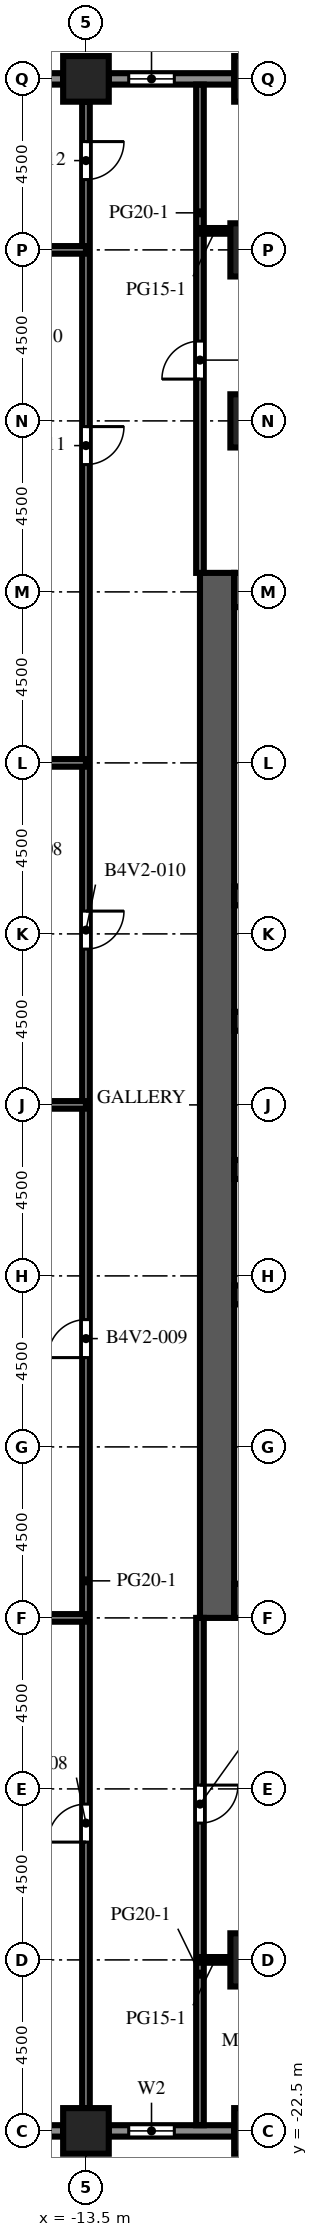
"""IFC4 building model, lengths in metres.
Left out: names, types, materials, properties, quantities, classifications, styles, units other than length and angle.
Written with IfcOpenShell. Run it as: python <this file> out.ifc"""

import sys

from ifc_helpers import new_model, si_unit, direction, frame, frame_2d, origin, origin_2d, place, context, subcontext, project, spatial, rectangle, extrude, element, fill, save


model = new_model("IFC4")
c1 = context("Model", 3, precision=1e-05, world=origin(), true_north=direction((0.0, 1.0)))
c2 = subcontext(c1, "Body", "Model", "MODEL_VIEW")
j1 = project(units=[si_unit("LENGTHUNIT", "METRE"), si_unit("PLANEANGLEUNIT", "RADIAN")], contexts=[c1])
p1 = place(None, origin())
s1 = spatial("IfcSite", under=j1, at=p1, CompositionType="ELEMENT")
p2 = place(p1, origin())
s2 = spatial("IfcBuilding", under=s1, at=p2, CompositionType="ELEMENT")
p3 = place(p2, frame((0.0, 0.0, 137.2)))
s3 = spatial("IfcBuildingStorey", under=s2, at=p3, CompositionType="ELEMENT", Elevation=137.2)
for number, where, z_axis, x_axis in (
    (1, (-13.5, -22.5, 0.0), (0.0, 0.0, 1.0), (1.0, 0.0, 0.0)),
    (2, (-13.5, 31.5, 0.0), (0.0, 0.0, 1.0), (1.0, 0.0, 0.0)),
    (3, (-9.0, -22.5, 0.0), (0.0, 0.0, 1.0), (1.0, 0.0, 0.0)),
    (4, (-9.0, 31.5, 0.0), (0.0, 0.0, 1.0), (1.0, 0.0, 0.0)),
):
    element("IfcColumn", number, at=place(p3, frame(where, z_axis=z_axis, x_axis=x_axis)), inside=s3, PredefinedType="COLUMN", context=c2, shape_type="SweptSolid", body=[
        extrude(rectangle(XDim=1.2, YDim=1.2, at=origin_2d()), origin(), (0.0, 0.0, 1.0), 4.1),
    ])
for number, where, z_axis, x_axis in (
    (5, (-9.0, -18.0, 0.0), (0.0, 0.0, 1.0), (1.0, 0.0, 0.0)),
    (6, (-9.0, 22.5, 0.0), (0.0, 0.0, 1.0), (1.0, 0.0, 0.0)),
    (7, (-9.0, 27.0, 0.0), (0.0, 0.0, 1.0), (1.0, 0.0, 0.0)),
):
    element("IfcColumn", number, at=place(p3, frame(where, z_axis=z_axis, x_axis=x_axis)), inside=s3, PredefinedType="COLUMN", context=c2, shape_type="SweptSolid", body=[
        extrude(rectangle(XDim=1.4, YDim=1.4, at=origin_2d()), origin(), (0.0, 0.0, 1.0), 4.1),
    ])
p4 = place(p3, frame((-10.05, -9.0, 0.0), z_axis=(0.0, 0.0, 1.0), x_axis=(0.0, 1.0, 0.0)))
e8 = element("IfcWall", 8, at=p4, inside=s3, PredefinedType="SHEAR", context=c2, shape_type="SweptSolid", body=[
    extrude(rectangle(XDim=27.5, YDim=0.9, at=frame_2d((13.75, 0.0))), origin(), (0.0, 0.0, 1.0), 4.1),
])
p5 = place(p4, frame((12.55, 0.0, 0.0)))
e9 = element("IfcOpeningElement", 9, at=p5, cuts=e8, PredefinedType="OPENING", context=c2, shape_type="SweptSolid", body=[
    extrude(rectangle(XDim=2.4, YDim=2.4, at=frame_2d((1.2, 1.2))), frame((0.0, 0.46, 0.0), z_axis=(0.0, -1.0, 0.0), x_axis=(1.0, 0.0, 0.0)), (0.0, 0.0, 1.0), 0.92),
])
p6 = place(p4, frame((6.825, 0.0, 0.0)))
e10 = element("IfcOpeningElement", 10, at=p6, cuts=e8, PredefinedType="OPENING", context=c2, shape_type="SweptSolid", body=[
    extrude(rectangle(XDim=1.2, YDim=2.1, at=frame_2d((0.6, 1.05))), frame((0.0, 0.46, 0.0), z_axis=(0.0, -1.0, 0.0), x_axis=(1.0, 0.0, 0.0)), (0.0, 0.0, 1.0), 0.92),
])
p7 = place(p4, frame((19.475, 0.0, 0.0)))
e11 = element("IfcOpeningElement", 11, at=p7, cuts=e8, PredefinedType="OPENING", context=c2, shape_type="SweptSolid", body=[
    extrude(rectangle(XDim=1.2, YDim=2.1, at=frame_2d((0.6, 1.05))), frame((0.0, 0.46, 0.0), z_axis=(0.0, -1.0, 0.0), x_axis=(1.0, 0.0, 0.0)), (0.0, 0.0, 1.0), 0.92),
])
for number, where, z_axis, x_axis in (
    (12, (-9.6, -8.55, 0.0), (0.0, 0.0, 1.0), (1.0, 0.0, 0.0)),
    (13, (-9.6, 18.05, 0.0), (0.0, 0.0, 1.0), (1.0, 0.0, 0.0)),
):
    element("IfcWall", number, at=place(p3, frame(where, z_axis=z_axis, x_axis=x_axis)), inside=s3, PredefinedType="SHEAR", context=c2, shape_type="SweptSolid", body=[
        extrude(rectangle(XDim=10.2, YDim=0.9, at=frame_2d((5.1, 0.0))), origin(), (0.0, 0.0, 1.0), 4.1),
    ])
p8 = place(p3, frame((-9.6, -0.5, 0.0), z_axis=(0.0, 0.0, 1.0), x_axis=(1.0, 0.0, 0.0)))
e14 = element("IfcWall", 14, at=p8, inside=s3, PredefinedType="SHEAR", context=c2, shape_type="SweptSolid", body=[
    extrude(rectangle(XDim=10.2, YDim=0.5, at=frame_2d((5.1, 0.0))), origin(), (0.0, 0.0, 1.0), 4.1),
])
p9 = place(p3, frame((-9.6, 2.8, 0.0), z_axis=(0.0, 0.0, 1.0), x_axis=(1.0, 0.0, 0.0)))
e15 = element("IfcWall", 15, at=p9, inside=s3, PredefinedType="SHEAR", context=c2, shape_type="SweptSolid", body=[
    extrude(rectangle(XDim=10.2, YDim=0.5, at=frame_2d((5.1, 0.0))), origin(), (0.0, 0.0, 1.0), 4.1),
])
p10 = place(p9, frame((0.562, 0.0, 0.0)))
e16 = element("IfcOpeningElement", 16, at=p10, cuts=e15, PredefinedType="OPENING", context=c2, shape_type="SweptSolid", body=[
    extrude(rectangle(XDim=1.1, YDim=2.1, at=frame_2d((0.55, 1.05))), frame((0.0, 0.26, 0.0), z_axis=(0.0, -1.0, 0.0), x_axis=(1.0, 0.0, 0.0)), (0.0, 0.0, 1.0), 0.52),
])
p11 = place(p9, frame((3.238, 0.0, 0.0)))
e17 = element("IfcOpeningElement", 17, at=p11, cuts=e15, PredefinedType="OPENING", context=c2, shape_type="SweptSolid", body=[
    extrude(rectangle(XDim=1.1, YDim=2.1, at=frame_2d((0.55, 1.05))), frame((0.0, 0.26, 0.0), z_axis=(0.0, -1.0, 0.0), x_axis=(1.0, 0.0, 0.0)), (0.0, 0.0, 1.0), 0.52),
])
p12 = place(p9, frame((8.538, 0.0, 0.0)))
e18 = element("IfcOpeningElement", 18, at=p12, cuts=e15, PredefinedType="OPENING", context=c2, shape_type="SweptSolid", body=[
    extrude(rectangle(XDim=1.1, YDim=2.1, at=frame_2d((0.55, 1.05))), frame((0.0, 0.26, 0.0), z_axis=(0.0, -1.0, 0.0), x_axis=(1.0, 0.0, 0.0)), (0.0, 0.0, 1.0), 0.52),
])
p13 = place(p3, frame((-9.6, 6.7, 0.0), z_axis=(0.0, 0.0, 1.0), x_axis=(1.0, 0.0, 0.0)))
e19 = element("IfcWall", 19, at=p13, inside=s3, PredefinedType="SHEAR", context=c2, shape_type="SweptSolid", body=[
    extrude(rectangle(XDim=10.2, YDim=0.5, at=frame_2d((5.1, 0.0))), origin(), (0.0, 0.0, 1.0), 4.1),
])
p14 = place(p13, frame((0.562, 0.0, 0.0)))
e20 = element("IfcOpeningElement", 20, at=p14, cuts=e19, PredefinedType="OPENING", context=c2, shape_type="SweptSolid", body=[
    extrude(rectangle(XDim=1.1, YDim=2.1, at=frame_2d((0.55, 1.05))), frame((0.0, 0.26, 0.0), z_axis=(0.0, -1.0, 0.0), x_axis=(1.0, 0.0, 0.0)), (0.0, 0.0, 1.0), 0.52),
])
p15 = place(p13, frame((3.288, 0.0, 0.0)))
e21 = element("IfcOpeningElement", 21, at=p15, cuts=e19, PredefinedType="OPENING", context=c2, shape_type="SweptSolid", body=[
    extrude(rectangle(XDim=1.0, YDim=2.1, at=frame_2d((0.5, 1.05))), frame((0.0, 0.26, 0.0), z_axis=(0.0, -1.0, 0.0), x_axis=(1.0, 0.0, 0.0)), (0.0, 0.0, 1.0), 0.52),
])
p16 = place(p13, frame((5.913, 0.0, 0.0)))
e22 = element("IfcOpeningElement", 22, at=p16, cuts=e19, PredefinedType="OPENING", context=c2, shape_type="SweptSolid", body=[
    extrude(rectangle(XDim=1.0, YDim=2.1, at=frame_2d((0.5, 1.05))), frame((0.0, 0.26, 0.0), z_axis=(0.0, -1.0, 0.0), x_axis=(1.0, 0.0, 0.0)), (0.0, 0.0, 1.0), 0.52),
])
p17 = place(p13, frame((8.587, 0.0, 0.0)))
e23 = element("IfcOpeningElement", 23, at=p17, cuts=e19, PredefinedType="OPENING", context=c2, shape_type="SweptSolid", body=[
    extrude(rectangle(XDim=1.0, YDim=2.1, at=frame_2d((0.5, 1.05))), frame((0.0, 0.26, 0.0), z_axis=(0.0, -1.0, 0.0), x_axis=(1.0, 0.0, 0.0)), (0.0, 0.0, 1.0), 0.52),
])
p18 = place(p3, frame((-9.6, 10.0, 0.0), z_axis=(0.0, 0.0, 1.0), x_axis=(1.0, 0.0, 0.0)))
e24 = element("IfcWall", 24, at=p18, inside=s3, PredefinedType="SHEAR", context=c2, shape_type="SweptSolid", body=[
    extrude(rectangle(XDim=10.2, YDim=0.5, at=frame_2d((5.1, 0.0))), origin(), (0.0, 0.0, 1.0), 4.1),
])
p19 = place(p3, frame((-14.1, -22.5, 0.0), z_axis=(0.0, 0.0, 1.0), x_axis=(-1.0, 0.0, 0.0)))
e25 = element("IfcWall", 25, at=p19, inside=s3, PredefinedType="SOLIDWALL", context=c2, shape_type="SweptSolid", body=[
    extrude(rectangle(XDim=3.3, YDim=0.3, at=frame_2d((1.65, 0.0))), origin(), (0.0, 0.0, 1.0), 2.75),
])
p20 = place(p19, frame((1.15, 0.0, 0.0)))
e26 = element("IfcOpeningElement", 26, at=p20, cuts=e25, PredefinedType="OPENING", context=c2, shape_type="SweptSolid", body=[
    extrude(rectangle(XDim=1.0, YDim=2.2, at=frame_2d((0.5, 1.1))), frame((0.0, 0.16, 0.0), z_axis=(0.0, -1.0, 0.0), x_axis=(1.0, 0.0, 0.0)), (0.0, 0.0, 1.0), 0.32),
])
p21 = place(p3, frame((-9.6, -22.5, 0.0), z_axis=(0.0, 0.0, 1.0), x_axis=(-1.0, 0.0, 0.0)))
e27 = element("IfcWall", 27, at=p21, inside=s3, PredefinedType="SOLIDWALL", context=c2, shape_type="SweptSolid", body=[
    extrude(rectangle(XDim=3.3, YDim=0.3, at=frame_2d((1.65, 0.0))), origin(), (0.0, 0.0, 1.0), 2.75),
])
p22 = place(p21, frame((1.575, 0.0, 0.8)))
e28 = element("IfcOpeningElement", 28, at=p22, cuts=e27, PredefinedType="OPENING", context=c2, shape_type="SweptSolid", body=[
    extrude(rectangle(XDim=1.2, YDim=1.7, at=frame_2d((0.6, 0.85))), frame((0.0, 0.16, 0.0), z_axis=(0.0, -1.0, 0.0), x_axis=(1.0, 0.0, 0.0)), (0.0, 0.0, 1.0), 0.32),
])
p23 = place(p3, frame((-12.9, 31.5, 0.0), z_axis=(0.0, 0.0, 1.0), x_axis=(1.0, 0.0, 0.0)))
e29 = element("IfcWall", 29, at=p23, inside=s3, PredefinedType="SOLIDWALL", context=c2, shape_type="SweptSolid", body=[
    extrude(rectangle(XDim=3.3, YDim=0.3, at=frame_2d((1.65, 0.0))), origin(), (0.0, 0.0, 1.0), 2.75),
])
p24 = place(p23, frame((0.525, 0.0, 0.8)))
e30 = element("IfcOpeningElement", 30, at=p24, cuts=e29, PredefinedType="OPENING", context=c2, shape_type="SweptSolid", body=[
    extrude(rectangle(XDim=1.2, YDim=1.7, at=frame_2d((0.6, 0.85))), frame((0.0, 0.16, 0.0), z_axis=(0.0, -1.0, 0.0), x_axis=(1.0, 0.0, 0.0)), (0.0, 0.0, 1.0), 0.32),
])
p25 = place(p3, frame((-17.4, 31.5, 0.0), z_axis=(0.0, 0.0, 1.0), x_axis=(1.0, 0.0, 0.0)))
e31 = element("IfcWall", 31, at=p25, inside=s3, PredefinedType="SOLIDWALL", context=c2, shape_type="SweptSolid", body=[
    extrude(rectangle(XDim=3.3, YDim=0.3, at=frame_2d((1.65, 0.0))), origin(), (0.0, 0.0, 1.0), 2.75),
])
p26 = place(p25, frame((1.15, 0.0, 0.0)))
e32 = element("IfcOpeningElement", 32, at=p26, cuts=e31, PredefinedType="OPENING", context=c2, shape_type="SweptSolid", body=[
    extrude(rectangle(XDim=1.0, YDim=2.2, at=frame_2d((0.5, 1.1))), frame((0.0, 0.16, 0.0), z_axis=(0.0, -1.0, 0.0), x_axis=(1.0, 0.0, 0.0)), (0.0, 0.0, 1.0), 0.32),
])
p27 = place(p3, frame((-13.5, -21.9, 0.0), z_axis=(0.0, 0.0, 1.0), x_axis=(0.0, 1.0, 0.0)))
e33 = element("IfcWall", 33, at=p27, inside=s3, PredefinedType="PARTITIONING", context=c2, shape_type="SweptSolid", body=[
    extrude(rectangle(XDim=52.8, YDim=0.2, at=frame_2d((26.4, 0.0))), origin(), (0.0, 0.0, 1.0), 3.65),
])
p28 = place(p27, frame((7.0, 0.0, 0.0)))
e34 = element("IfcOpeningElement", 34, at=p28, cuts=e33, PredefinedType="OPENING", context=c2, shape_type="SweptSolid", body=[
    extrude(rectangle(XDim=1.0, YDim=2.1, at=frame_2d((0.5, 1.05))), frame((0.0, 0.11, 0.0), z_axis=(0.0, -1.0, 0.0), x_axis=(1.0, 0.0, 0.0)), (0.0, 0.0, 1.0), 0.22),
])
p29 = place(p27, frame((19.75, 0.0, 0.0)))
e35 = element("IfcOpeningElement", 35, at=p29, cuts=e33, PredefinedType="OPENING", context=c2, shape_type="SweptSolid", body=[
    extrude(rectangle(XDim=1.0, YDim=2.1, at=frame_2d((0.5, 1.05))), frame((0.0, 0.11, 0.0), z_axis=(0.0, -1.0, 0.0), x_axis=(1.0, 0.0, 0.0)), (0.0, 0.0, 1.0), 0.22),
])
p30 = place(p27, frame((30.5, 0.0, 0.0)))
e36 = element("IfcOpeningElement", 36, at=p30, cuts=e33, PredefinedType="OPENING", context=c2, shape_type="SweptSolid", body=[
    extrude(rectangle(XDim=1.0, YDim=2.1, at=frame_2d((0.5, 1.05))), frame((0.0, 0.11, 0.0), z_axis=(0.0, -1.0, 0.0), x_axis=(1.0, 0.0, 0.0)), (0.0, 0.0, 1.0), 0.22),
])
p31 = place(p27, frame((43.25, 0.0, 0.0)))
e37 = element("IfcOpeningElement", 37, at=p31, cuts=e33, PredefinedType="OPENING", context=c2, shape_type="SweptSolid", body=[
    extrude(rectangle(XDim=1.0, YDim=2.1, at=frame_2d((0.5, 1.05))), frame((0.0, 0.11, 0.0), z_axis=(0.0, -1.0, 0.0), x_axis=(1.0, 0.0, 0.0)), (0.0, 0.0, 1.0), 0.22),
])
p32 = place(p27, frame((50.75, 0.0, 0.0)))
e38 = element("IfcOpeningElement", 38, at=p32, cuts=e33, PredefinedType="OPENING", context=c2, shape_type="SweptSolid", body=[
    extrude(rectangle(XDim=1.0, YDim=2.1, at=frame_2d((0.5, 1.05))), frame((0.0, 0.11, 0.0), z_axis=(0.0, -1.0, 0.0), x_axis=(1.0, 0.0, 0.0)), (0.0, 0.0, 1.0), 0.22),
])
p33 = place(p3, frame((-10.5, -9.0, 0.0), z_axis=(0.0, 0.0, 1.0), x_axis=(0.0, -1.0, 0.0)))
e39 = element("IfcWall", 39, at=p33, inside=s3, PredefinedType="PARTITIONING", context=c2, shape_type="SweptSolid", body=[
    extrude(rectangle(XDim=13.35, YDim=0.2, at=frame_2d((6.675, 0.0))), origin(), (0.0, 0.0, 1.0), 3.65),
])
p34 = place(p33, frame((4.4, 0.0, 0.0)))
e40 = element("IfcOpeningElement", 40, at=p34, cuts=e39, PredefinedType="OPENING", context=c2, shape_type="SweptSolid", body=[
    extrude(rectangle(XDim=1.0, YDim=2.1, at=frame_2d((0.5, 1.05))), frame((0.0, 0.11, 0.0), z_axis=(0.0, -1.0, 0.0), x_axis=(1.0, 0.0, 0.0)), (0.0, 0.0, 1.0), 0.22),
])
p35 = place(p3, frame((-10.5, 31.35, 0.0), z_axis=(0.0, 0.0, 1.0), x_axis=(0.0, -1.0, 0.0)))
e41 = element("IfcWall", 41, at=p35, inside=s3, PredefinedType="PARTITIONING", context=c2, shape_type="SweptSolid", body=[
    extrude(rectangle(XDim=12.85, YDim=0.2, at=frame_2d((6.425, 0.0))), origin(), (0.0, 0.0, 1.0), 3.65),
])
p36 = place(p35, frame((6.75, 0.0, 0.0)))
e42 = element("IfcOpeningElement", 42, at=p36, cuts=e41, PredefinedType="OPENING", context=c2, shape_type="SweptSolid", body=[
    extrude(rectangle(XDim=1.0, YDim=2.1, at=frame_2d((0.5, 1.05))), frame((0.0, 0.11, 0.0), z_axis=(0.0, -1.0, 0.0), x_axis=(1.0, 0.0, 0.0)), (0.0, 0.0, 1.0), 0.22),
])
p37 = place(p3, frame((-10.5, -18.0, 0.0), z_axis=(0.0, 0.0, 1.0), x_axis=(1.0, 0.0, 0.0)))
e43 = element("IfcWall", 43, at=p37, inside=s3, PredefinedType="PARTITIONING", context=c2, shape_type="SweptSolid", body=[
    extrude(rectangle(XDim=0.8, YDim=0.15, at=frame_2d((0.4, 0.0))), origin(), (0.0, 0.0, 1.0), 3.65),
])
p38 = place(p3, frame((-17.3, -9.0, 0.0), z_axis=(0.0, 0.0, 1.0), x_axis=(1.0, 0.0, 0.0)))
e44 = element("IfcWall", 44, at=p38, inside=s3, PredefinedType="PARTITIONING", context=c2, shape_type="SweptSolid", body=[
    extrude(rectangle(XDim=3.8, YDim=0.2, at=frame_2d((1.9, 0.0))), origin(), (0.0, 0.0, 1.0), 3.65),
])
for number, where, z_axis, x_axis in (
    (45, (-26.4, 4.5, 0.0), (0.0, 0.0, 1.0), (1.0, 0.0, 0.0)),
    (46, (-26.4, 13.5, 0.0), (0.0, 0.0, 1.0), (1.0, 0.0, 0.0)),
):
    element("IfcWall", number, at=place(p3, frame(where, z_axis=z_axis, x_axis=x_axis)), inside=s3, PredefinedType="PARTITIONING", context=c2, shape_type="SweptSolid", body=[
        extrude(rectangle(XDim=12.9, YDim=0.2, at=frame_2d((6.45, 0.0))), origin(), (0.0, 0.0, 1.0), 3.65),
    ])
p39 = place(p3, frame((-17.3, 27.0, 0.0), z_axis=(0.0, 0.0, 1.0), x_axis=(1.0, 0.0, 0.0)))
e47 = element("IfcWall", 47, at=p39, inside=s3, PredefinedType="PARTITIONING", context=c2, shape_type="SweptSolid", body=[
    extrude(rectangle(XDim=3.8, YDim=0.2, at=frame_2d((1.9, 0.0))), origin(), (0.0, 0.0, 1.0), 3.65),
])
p40 = place(p3, frame((-10.5, 27.5, 0.0), z_axis=(0.0, 0.0, 1.0), x_axis=(1.0, 0.0, 0.0)))
e48 = element("IfcWall", 48, at=p40, inside=s3, PredefinedType="PARTITIONING", context=c2, shape_type="SweptSolid", body=[
    extrude(rectangle(XDim=0.8, YDim=0.15, at=frame_2d((0.4, 0.0))), origin(), (0.0, 0.0, 1.0), 3.65),
])
p41 = place(p22, origin())
e49 = element("IfcWindow", 49, at=p41, inside=s3, PartitioningType="SINGLE_PANEL", PredefinedType="WINDOW", context=c2, shape_type="SweptSolid", body=[
    extrude(rectangle(XDim=1.2, YDim=1.7, at=frame_2d((0.6, 0.85))), frame((0.0, 0.03, 0.0), z_axis=(0.0, -1.0, 0.0), x_axis=(1.0, 0.0, 0.0)), (0.0, 0.0, 1.0), 0.06),
])
fill(e28, e49)
p42 = place(p24, origin())
e50 = element("IfcWindow", 50, at=p42, inside=s3, PartitioningType="SINGLE_PANEL", PredefinedType="WINDOW", context=c2, shape_type="SweptSolid", body=[
    extrude(rectangle(XDim=1.2, YDim=1.7, at=frame_2d((0.6, 0.85))), frame((0.0, 0.03, 0.0), z_axis=(0.0, -1.0, 0.0), x_axis=(1.0, 0.0, 0.0)), (0.0, 0.0, 1.0), 0.06),
])
fill(e30, e50)
p43 = place(p5, origin())
e51 = element("IfcDoor", 51, at=p43, inside=s3, OperationType="DOUBLE_DOOR_DOUBLE_SWING", PredefinedType="DOOR", context=c2, shape_type="SweptSolid", body=[
    extrude(rectangle(XDim=2.4, YDim=2.4, at=frame_2d((1.2, 1.2))), frame((0.0, 0.025, 0.0), z_axis=(0.0, -1.0, 0.0), x_axis=(1.0, 0.0, 0.0)), (0.0, 0.0, 1.0), 0.05),
])
fill(e9, e51)
p44 = place(p6, origin())
e52 = element("IfcDoor", 52, at=p44, inside=s3, OperationType="SINGLE_SWING_LEFT", PredefinedType="DOOR", context=c2, shape_type="SweptSolid", body=[
    extrude(rectangle(XDim=1.2, YDim=2.1, at=frame_2d((0.6, 1.05))), frame((0.0, 0.025, 0.0), z_axis=(0.0, -1.0, 0.0), x_axis=(1.0, 0.0, 0.0)), (0.0, 0.0, 1.0), 0.05),
])
fill(e10, e52)
p45 = place(p7, origin())
e53 = element("IfcDoor", 53, at=p45, inside=s3, OperationType="SINGLE_SWING_LEFT", PredefinedType="DOOR", context=c2, shape_type="SweptSolid", body=[
    extrude(rectangle(XDim=1.2, YDim=2.1, at=frame_2d((0.6, 1.05))), frame((0.0, 0.025, 0.0), z_axis=(0.0, -1.0, 0.0), x_axis=(1.0, 0.0, 0.0)), (0.0, 0.0, 1.0), 0.05),
])
fill(e11, e53)
p46 = place(p28, origin())
e54 = element("IfcDoor", 54, at=p46, inside=s3, OperationType="SINGLE_SWING_LEFT", PredefinedType="DOOR", context=c2, shape_type="SweptSolid", body=[
    extrude(rectangle(XDim=1.0, YDim=2.1, at=frame_2d((0.5, 1.05))), frame((0.0, 0.025, 0.0), z_axis=(0.0, -1.0, 0.0), x_axis=(1.0, 0.0, 0.0)), (0.0, 0.0, 1.0), 0.05),
])
fill(e34, e54)
p47 = place(p29, origin())
e55 = element("IfcDoor", 55, at=p47, inside=s3, OperationType="SINGLE_SWING_LEFT", PredefinedType="DOOR", context=c2, shape_type="SweptSolid", body=[
    extrude(rectangle(XDim=1.0, YDim=2.1, at=frame_2d((0.5, 1.05))), frame((0.0, 0.025, 0.0), z_axis=(0.0, -1.0, 0.0), x_axis=(1.0, 0.0, 0.0)), (0.0, 0.0, 1.0), 0.05),
])
fill(e35, e55)
p48 = place(p30, origin())
e56 = element("IfcDoor", 56, at=p48, inside=s3, OperationType="SINGLE_SWING_RIGHT", PredefinedType="DOOR", context=c2, shape_type="SweptSolid", body=[
    extrude(rectangle(XDim=1.0, YDim=2.1, at=frame_2d((0.5, 1.05))), frame((0.0, 0.025, 0.0), z_axis=(0.0, -1.0, 0.0), x_axis=(1.0, 0.0, 0.0)), (0.0, 0.0, 1.0), 0.05),
])
fill(e36, e56)
p49 = place(p31, origin())
e57 = element("IfcDoor", 57, at=p49, inside=s3, OperationType="SINGLE_SWING_RIGHT", PredefinedType="DOOR", context=c2, shape_type="SweptSolid", body=[
    extrude(rectangle(XDim=1.0, YDim=2.1, at=frame_2d((0.5, 1.05))), frame((0.0, 0.025, 0.0), z_axis=(0.0, -1.0, 0.0), x_axis=(1.0, 0.0, 0.0)), (0.0, 0.0, 1.0), 0.05),
])
fill(e37, e57)
p50 = place(p32, origin())
e58 = element("IfcDoor", 58, at=p50, inside=s3, OperationType="SINGLE_SWING_RIGHT", PredefinedType="DOOR", context=c2, shape_type="SweptSolid", body=[
    extrude(rectangle(XDim=1.0, YDim=2.1, at=frame_2d((0.5, 1.05))), frame((0.0, 0.025, 0.0), z_axis=(0.0, -1.0, 0.0), x_axis=(1.0, 0.0, 0.0)), (0.0, 0.0, 1.0), 0.05),
])
fill(e38, e58)
p51 = place(p34, origin())
e59 = element("IfcDoor", 59, at=p51, inside=s3, OperationType="SINGLE_SWING_LEFT", PredefinedType="DOOR", context=c2, shape_type="SweptSolid", body=[
    extrude(rectangle(XDim=1.0, YDim=2.1, at=frame_2d((0.5, 1.05))), frame((0.0, 0.025, 0.0), z_axis=(0.0, -1.0, 0.0), x_axis=(1.0, 0.0, 0.0)), (0.0, 0.0, 1.0), 0.05),
])
fill(e40, e59)
p52 = place(p36, origin())
e60 = element("IfcDoor", 60, at=p52, inside=s3, OperationType="SINGLE_SWING_RIGHT", PredefinedType="DOOR", context=c2, shape_type="SweptSolid", body=[
    extrude(rectangle(XDim=1.0, YDim=2.1, at=frame_2d((0.5, 1.05))), frame((0.0, 0.025, 0.0), z_axis=(0.0, -1.0, 0.0), x_axis=(1.0, 0.0, 0.0)), (0.0, 0.0, 1.0), 0.05),
])
fill(e42, e60)
save(model, sys.argv[1])
